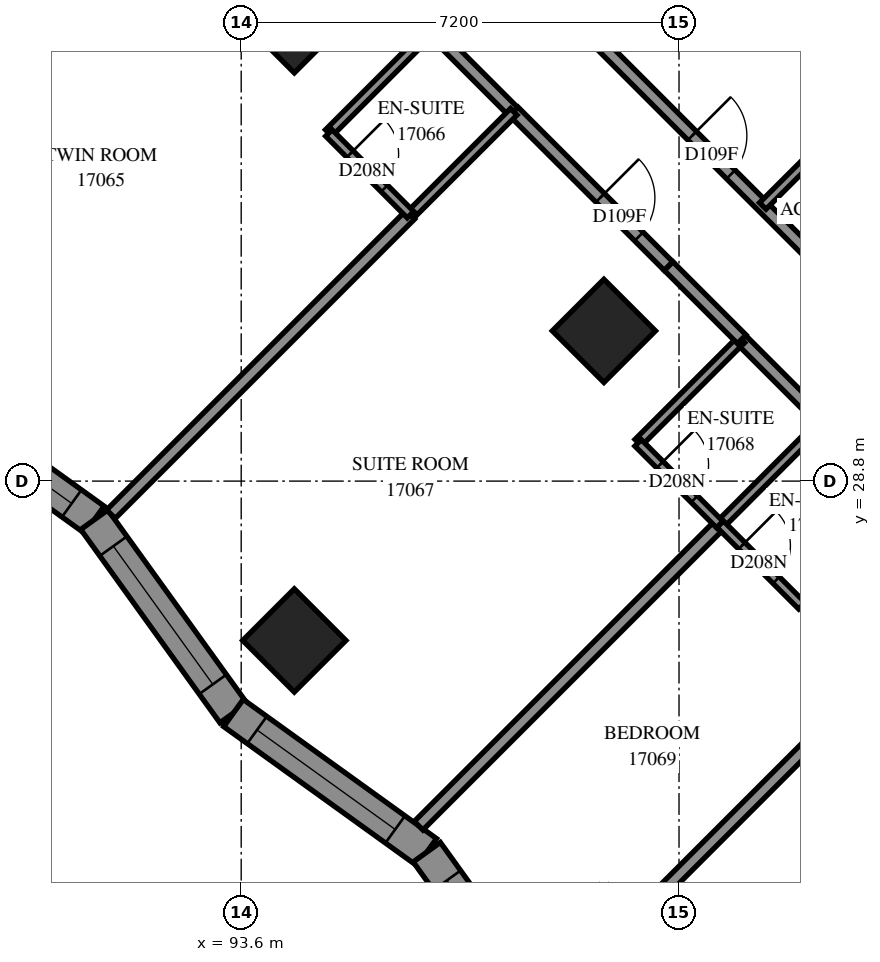
"""IFC4 building model, lengths in metres.
Left out: names, types, materials, properties, quantities, classifications, styles, units other than length and angle.
Written with IfcOpenShell. Run it as: python <this file> out.ifc"""

import sys

from ifc_helpers import new_model, si_unit, direction, frame, frame_2d, origin, origin_2d, place, context, subcontext, project, spatial, polyline, rectangle, outline, extrude, element, fill, save


model = new_model("IFC4")
c1 = context("Model", 3, precision=1e-05, world=origin(), true_north=direction((0.0, 1.0)))
c2 = subcontext(c1, "Body", "Model", "MODEL_VIEW")
j1 = project(units=[si_unit("LENGTHUNIT", "METRE"), si_unit("PLANEANGLEUNIT", "RADIAN")], contexts=[c1])
p1 = place(None, origin())
s1 = spatial("IfcSite", under=j1, at=p1, CompositionType="ELEMENT")
p2 = place(p1, origin())
s2 = spatial("IfcBuilding", under=s1, at=p2, CompositionType="ELEMENT")
p3 = place(p2, frame((0.0, 0.0, 64.4)))
s3 = spatial("IfcBuildingStorey", under=s2, at=p3, CompositionType="ELEMENT", Elevation=64.4)
for number, where, z_axis, x_axis in (
    (1, (94.474, 36.362, 0.0), (0.0, 0.0, 1.0), (0.707, -0.707, 0.0)),
    (2, (99.565, 31.271, 0.0), (0.0, 0.0, 1.0), (0.707, -0.707, 0.0)),
    (3, (94.474, 26.18, 0.0), (0.0, 0.0, 1.0), (0.707, -0.707, 0.0)),
):
    element("IfcColumn", number, at=place(p3, frame(where, z_axis=z_axis, x_axis=x_axis)), inside=s3, PredefinedType="COLUMN", context=c2, shape_type="SweptSolid", body=[
        extrude(rectangle(XDim=1.2, YDim=1.2, at=origin_2d()), origin(), (0.0, 0.0, 1.0), 3.1),
    ])
p4 = place(p3, frame((88.005, 30.454, 0.0), z_axis=(0.0, 0.0, 1.0), x_axis=(0.8116253681, -0.5841782792, 0.0)))
e4 = element("IfcWall", 4, at=p4, inside=s3, PredefinedType="SOLIDWALL", context=c2, shape_type="SweptSolid", body=[
    extrude(outline(polyline([(-0.045, -0.275), (3.872, -0.275), (3.962, 0.275), (0.045, 0.275), (-0.045, -0.275)])), origin(), (0.0, 0.0, 1.0), 3.1),
])
p5 = place(p4, frame((0.659, 0.0, 0.5)))
e5 = element("IfcOpeningElement", 5, at=p5, cuts=e4, PredefinedType="OPENING", context=c2, shape_type="SweptSolid", body=[
    extrude(rectangle(XDim=2.8, YDim=2.45, at=frame_2d((1.4, 1.225))), frame((0.0, 0.285, 0.0), z_axis=(0.0, -1.0, 0.0), x_axis=(1.0, 0.0, 0.0)), (0.0, 0.0, 1.0), 0.57),
])
p6 = place(p3, frame((91.184, 28.165, 0.0), z_axis=(0.0, 0.0, 1.0), x_axis=(0.5841782792, -0.8116253681, 0.0)))
e6 = element("IfcWall", 6, at=p6, inside=s3, PredefinedType="SOLIDWALL", context=c2, shape_type="SweptSolid", body=[
    extrude(outline(polyline([(0.045, -0.275), (3.962, -0.275), (3.872, 0.275), (-0.045, 0.275), (0.045, -0.275)])), origin(), (0.0, 0.0, 1.0), 3.1),
])
p7 = place(p6, frame((0.536, 0.0, 0.5)))
e7 = element("IfcOpeningElement", 7, at=p7, cuts=e6, PredefinedType="OPENING", context=c2, shape_type="SweptSolid", body=[
    extrude(rectangle(XDim=2.8, YDim=2.45, at=frame_2d((1.4, 1.225))), frame((0.0, 0.285, 0.0), z_axis=(0.0, -1.0, 0.0), x_axis=(1.0, 0.0, 0.0)), (0.0, 0.0, 1.0), 0.57),
])
p8 = place(p3, frame((93.473, 24.986, 0.0), z_axis=(0.0, 0.0, 1.0), x_axis=(0.8116253681, -0.5841782792, 0.0)))
e8 = element("IfcWall", 8, at=p8, inside=s3, PredefinedType="SOLIDWALL", context=c2, shape_type="SweptSolid", body=[
    extrude(outline(polyline([(-0.045, -0.275), (3.872, -0.275), (3.962, 0.275), (0.045, 0.275), (-0.045, -0.275)])), origin(), (0.0, 0.0, 1.0), 3.1),
])
p9 = place(p8, frame((0.477, 0.0, 0.5)))
e9 = element("IfcOpeningElement", 9, at=p9, cuts=e8, PredefinedType="OPENING", context=c2, shape_type="SweptSolid", body=[
    extrude(rectangle(XDim=2.8, YDim=2.45, at=frame_2d((1.4, 1.225))), frame((0.0, 0.285, 0.0), z_axis=(0.0, -1.0, 0.0), x_axis=(1.0, 0.0, 0.0)), (0.0, 0.0, 1.0), 0.57),
])
p10 = place(p3, frame((96.652, 22.698, 0.0), z_axis=(0.0, 0.0, 1.0), x_axis=(0.5841782792, -0.8116253681, 0.0)))
e10 = element("IfcWall", 10, at=p10, inside=s3, PredefinedType="SOLIDWALL", context=c2, shape_type="SweptSolid", body=[
    extrude(outline(polyline([(0.045, -0.275), (3.962, -0.275), (3.872, 0.275), (-0.045, 0.275), (0.045, -0.275)])), origin(), (0.0, 0.0, 1.0), 3.1),
])
p11 = place(p10, frame((0.57, 0.0, 0.7)))
e11 = element("IfcOpeningElement", 11, at=p11, cuts=e10, PredefinedType="OPENING", context=c2, shape_type="SweptSolid", body=[
    extrude(rectangle(XDim=1.8, YDim=2.0, at=frame_2d((0.9, 1.0))), frame((0.0, 0.285, 0.0), z_axis=(0.0, -1.0, 0.0), x_axis=(1.0, 0.0, 0.0)), (0.0, 0.0, 1.0), 0.57),
])
p12 = place(p3, frame((101.825, 31.125, 0.0), z_axis=(0.0, 0.0, 1.0), x_axis=(0.7071067812, -0.7071067812, 0.0)))
e12 = element("IfcWall", 12, at=p12, inside=s3, PredefinedType="PARTITIONING", context=c2, shape_type="SweptSolid", body=[
    extrude(rectangle(XDim=12.7, YDim=0.2, at=frame_2d((6.35, 0.0))), origin(), (0.0, 0.0, 1.0), 3.1),
])
p13 = place(p12, frame((3.895, 0.0, 0.0)))
e13 = element("IfcOpeningElement", 13, at=p13, cuts=e12, PredefinedType="OPENING", context=c2, shape_type="SweptSolid", body=[
    extrude(rectangle(XDim=0.9, YDim=2.1, at=frame_2d((0.45, 1.05))), frame((0.0, 0.11, 0.0), z_axis=(0.0, -1.0, 0.0), x_axis=(1.0, 0.0, 0.0)), (0.0, 0.0, 1.0), 0.22),
])
p14 = place(p12, frame((9.056, 0.0, 0.0)))
e14 = element("IfcOpeningElement", 14, at=p14, cuts=e12, PredefinedType="OPENING", context=c2, shape_type="SweptSolid", body=[
    extrude(rectangle(XDim=1.0, YDim=2.1, at=frame_2d((0.5, 1.05))), frame((0.0, 0.11, 0.0), z_axis=(0.0, -1.0, 0.0), x_axis=(1.0, 0.0, 0.0)), (0.0, 0.0, 1.0), 0.22),
])
p15 = place(p3, frame((86.309, 33.281, 0.0), z_axis=(0.0, 0.0, 1.0), x_axis=(0.7069956745, 0.7072178704, 0.0)))
e15 = element("IfcWall", 15, at=p15, inside=s3, PredefinedType="PARTITIONING", context=c2, shape_type="SweptSolid", body=[
    extrude(rectangle(XDim=9.451, YDim=0.2, at=frame_2d((4.726, 0.0))), origin(), (0.0, 0.0, 1.0), 3.1),
])
p16 = place(p3, frame((92.349, 40.601, 0.0), z_axis=(0.0, 0.0, 1.0), x_axis=(0.7071067812, -0.7071067812, 0.0)))
e16 = element("IfcWall", 16, at=p16, inside=s3, PredefinedType="PARTITIONING", context=c2, shape_type="SweptSolid", body=[
    extrude(rectangle(XDim=8.101, YDim=0.2, at=frame_2d((4.05, 0.0))), origin(), (0.0, 0.0, 1.0), 3.1),
])
p17 = place(p16, frame((2.909, 0.0, 0.0)))
e17 = element("IfcOpeningElement", 17, at=p17, cuts=e16, PredefinedType="OPENING", context=c2, shape_type="SweptSolid", body=[
    extrude(rectangle(XDim=0.9, YDim=2.1, at=frame_2d((0.45, 1.05))), frame((0.0, 0.11, 0.0), z_axis=(0.0, -1.0, 0.0), x_axis=(1.0, 0.0, 0.0)), (0.0, 0.0, 1.0), 0.22),
])
p18 = place(p3, frame((86.836, 35.372, 0.0), z_axis=(0.0, 0.0, 1.0), x_axis=(0.7071067812, 0.7071067812, 0.0)))
e18 = element("IfcWall", 18, at=p18, inside=s3, PredefinedType="PARTITIONING", context=c2, shape_type="SweptSolid", body=[
    extrude(rectangle(XDim=7.6, YDim=0.2, at=frame_2d((3.8, 0.0))), origin(), (0.0, 0.0, 1.0), 3.1),
])
p19 = place(p18, frame((6.342, 0.0, 0.0)))
e19 = element("IfcOpeningElement", 19, at=p19, cuts=e18, PredefinedType="OPENING", context=c2, shape_type="SweptSolid", body=[
    extrude(rectangle(XDim=1.0, YDim=2.1, at=frame_2d((0.5, 1.05))), frame((0.0, 0.11, 0.0), z_axis=(0.0, -1.0, 0.0), x_axis=(1.0, 0.0, 0.0)), (0.0, 0.0, 1.0), 0.22),
])
p20 = place(p3, frame((99.349, 36.147, 0.0), z_axis=(0.0, 0.0, 1.0), x_axis=(0.7071067812, -0.7071067812, 0.0)))
e20 = element("IfcWall", 20, at=p20, inside=s3, PredefinedType="PARTITIONING", context=c2, shape_type="SweptSolid", body=[
    extrude(rectangle(XDim=7.201, YDim=0.2, at=frame_2d((3.601, 0.0))), origin(), (0.0, 0.0, 1.0), 3.1),
])
p21 = place(p20, frame((2.358, 0.0, 0.0)))
e21 = element("IfcOpeningElement", 21, at=p21, cuts=e20, PredefinedType="OPENING", context=c2, shape_type="SweptSolid", body=[
    extrude(rectangle(XDim=0.9, YDim=2.1, at=frame_2d((0.45, 1.05))), frame((0.0, 0.11, 0.0), z_axis=(0.0, -1.0, 0.0), x_axis=(1.0, 0.0, 0.0)), (0.0, 0.0, 1.0), 0.22),
])
p22 = place(p3, frame((96.517, 23.134, 0.0), z_axis=(0.0, 0.0, 1.0), x_axis=(0.7071139158, 0.7070996465, 0.0)))
e22 = element("IfcWall", 22, at=p22, inside=s3, PredefinedType="PARTITIONING", context=c2, shape_type="SweptSolid", body=[
    extrude(rectangle(XDim=7.008, YDim=0.2, at=frame_2d((3.504, 0.0))), origin(), (0.0, 0.0, 1.0), 3.1),
])
p23 = place(p3, frame((91.458, 28.256, 0.0), z_axis=(0.0, 0.0, 1.0), x_axis=(0.7071067812, 0.7071067812, 0.0)))
e23 = element("IfcWall", 23, at=p23, inside=s3, PredefinedType="PARTITIONING", context=c2, shape_type="SweptSolid", body=[
    extrude(rectangle(XDim=6.963, YDim=0.2, at=frame_2d((3.482, 0.0))), origin(), (0.0, 0.0, 1.0), 3.1),
])
p24 = place(p3, frame((100.163, 21.689, 0.0), z_axis=(0.0, 0.0, 1.0), x_axis=(0.7071067812, 0.7071067812, 0.0)))
e24 = element("IfcWall", 24, at=p24, inside=s3, PredefinedType="PARTITIONING", context=c2, shape_type="SweptSolid", body=[
    extrude(rectangle(XDim=5.504, YDim=0.2, at=frame_2d((2.752, 0.0))), origin(), (0.0, 0.0, 1.0), 2.6),
])
p25 = place(p3, frame((98.082, 34.879, 0.0), z_axis=(0.0, 0.0, 1.0), x_axis=(0.7073845681, -0.7068288851, 0.0)))
e25 = element("IfcWall", 25, at=p25, inside=s3, PredefinedType="PARTITIONING", context=c2, shape_type="SweptSolid", body=[
    extrude(rectangle(XDim=3.599, YDim=0.2, at=frame_2d((1.8, 0.0))), origin(), (0.0, 0.0, 1.0), 3.1),
])
p26 = place(p25, frame((2.009, 0.0, 0.0)))
e26 = element("IfcOpeningElement", 26, at=p26, cuts=e25, PredefinedType="OPENING", context=c2, shape_type="SweptSolid", body=[
    extrude(rectangle(XDim=0.9, YDim=2.1, at=frame_2d((0.45, 1.05))), frame((0.0, 0.11, 0.0), z_axis=(0.0, -1.0, 0.0), x_axis=(1.0, 0.0, 0.0)), (0.0, 0.0, 1.0), 0.22),
])
p27 = place(p3, frame((100.129, 29.433, 0.0), z_axis=(0.0, 0.0, 1.0), x_axis=(0.7071067812, 0.7071067812, 0.0)))
e27 = element("IfcWall", 27, at=p27, inside=s3, PredefinedType="PARTITIONING", context=c2, shape_type="SweptSolid", body=[
    extrude(rectangle(XDim=2.401, YDim=0.15, at=frame_2d((1.201, 0.0))), origin(), (0.0, 0.0, 1.0), 3.1),
])
for number, where, z_axis, x_axis in (
    (28, (96.384, 33.178, 0.0), (0.0, 0.0, 1.0), (0.708, 0.707, 0.0)),
    (29, (101.477, 28.085, 0.0), (0.0, 0.0, 1.0), (0.707, 0.708, 0.0)),
    (30, (102.177, 33.325, 0.0), (0.0, 0.0, 1.0), (0.708, 0.707, 0.0)),
):
    element("IfcWall", number, at=place(p3, frame(where, z_axis=z_axis, x_axis=x_axis)), inside=s3, PredefinedType="PARTITIONING", context=c2, shape_type="SweptSolid", body=[
        extrude(rectangle(XDim=2.4, YDim=0.15, at=frame_2d((1.2, 0.0))), origin(), (0.0, 0.0, 1.0), 3.1),
    ])
for number, where, z_axis, x_axis in (
    (31, (95.039, 34.525, 0.0), (0.0, 0.0, 1.0), (0.707, 0.707, 0.0)),
    (32, (102.817, 26.747, 0.0), (0.0, 0.0, 1.0), (0.707, 0.707, 0.0)),
):
    element("IfcWall", number, at=place(p3, frame(where, z_axis=z_axis, x_axis=x_axis)), inside=s3, PredefinedType="PARTITIONING", context=c2, shape_type="SweptSolid", body=[
        extrude(rectangle(XDim=2.398, YDim=0.15, at=frame_2d((1.199, 0.0))), origin(), (0.0, 0.0, 1.0), 3.1),
    ])
p28 = place(p3, frame((100.127, 29.429, 0.0), z_axis=(0.0, 0.0, 1.0), x_axis=(0.7071067812, -0.7071067812, 0.0)))
e33 = element("IfcWall", 33, at=p28, inside=s3, PredefinedType="PARTITIONING", context=c2, shape_type="SweptSolid", body=[
    extrude(rectangle(XDim=1.901, YDim=0.15, at=frame_2d((0.95, 0.0))), origin(), (0.0, 0.0, 1.0), 3.1),
])
p29 = place(p28, frame((0.508, 0.0, 0.0)))
e34 = element("IfcOpeningElement", 34, at=p29, cuts=e33, PredefinedType="OPENING", context=c2, shape_type="SweptSolid", body=[
    extrude(rectangle(XDim=0.8, YDim=2.1, at=frame_2d((0.4, 1.05))), frame((0.0, 0.085, 0.0), z_axis=(0.0, -1.0, 0.0), x_axis=(1.0, 0.0, 0.0)), (0.0, 0.0, 1.0), 0.17),
])
p30 = place(p3, frame((95.042, 34.526, 0.0), z_axis=(0.0, 0.0, 1.0), x_axis=(0.7065800724, -0.7076330979, 0.0)))
e35 = element("IfcWall", 35, at=p30, inside=s3, PredefinedType="PARTITIONING", context=c2, shape_type="SweptSolid", body=[
    extrude(rectangle(XDim=1.899, YDim=0.15, at=frame_2d((0.95, 0.0))), origin(), (0.0, 0.0, 1.0), 3.1),
])
p31 = place(p30, frame((0.491, 0.0, 0.0)))
e36 = element("IfcOpeningElement", 36, at=p31, cuts=e35, PredefinedType="OPENING", context=c2, shape_type="SweptSolid", body=[
    extrude(rectangle(XDim=0.8, YDim=2.1, at=frame_2d((0.4, 1.05))), frame((0.0, 0.085, 0.0), z_axis=(0.0, -1.0, 0.0), x_axis=(1.0, 0.0, 0.0)), (0.0, 0.0, 1.0), 0.17),
])
p32 = place(p3, frame((101.477, 28.091, 0.0), z_axis=(0.0, 0.0, 1.0), x_axis=(0.7076330979, -0.7065800724, 0.0)))
e37 = element("IfcWall", 37, at=p32, inside=s3, PredefinedType="PARTITIONING", context=c2, shape_type="SweptSolid", body=[
    extrude(rectangle(XDim=1.899, YDim=0.15, at=frame_2d((0.95, 0.0))), origin(), (0.0, 0.0, 1.0), 3.1),
])
p33 = place(p32, frame((0.501, 0.0, 0.0)))
e38 = element("IfcOpeningElement", 38, at=p33, cuts=e37, PredefinedType="OPENING", context=c2, shape_type="SweptSolid", body=[
    extrude(rectangle(XDim=0.8, YDim=2.1, at=frame_2d((0.4, 1.05))), frame((0.0, 0.085, 0.0), z_axis=(0.0, -1.0, 0.0), x_axis=(1.0, 0.0, 0.0)), (0.0, 0.0, 1.0), 0.17),
])
p34 = place(p3, frame((100.629, 32.335, 0.0), z_axis=(0.0, 0.0, 1.0), x_axis=(0.7071067812, -0.7071067812, 0.0)))
e39 = element("IfcWall", 39, at=p34, inside=s3, PredefinedType="PARTITIONING", context=c2, shape_type="SweptSolid", body=[
    extrude(rectangle(XDim=1.7, YDim=0.2, at=frame_2d((0.85, 0.0))), origin(), (0.0, 0.0, 1.0), 3.1),
])
p35 = place(p5, origin())
e40 = element("IfcWindow", 40, at=p35, inside=s3, PartitioningType="SINGLE_PANEL", PredefinedType="WINDOW", context=c2, shape_type="SweptSolid", body=[
    extrude(rectangle(XDim=2.8, YDim=2.45, at=frame_2d((1.4, 1.225))), frame((0.0, 0.155, 0.0), z_axis=(0.0, -1.0, 0.0), x_axis=(1.0, 0.0, 0.0)), (0.0, 0.0, 1.0), 0.06),
])
fill(e5, e40)
p36 = place(p7, origin())
e41 = element("IfcWindow", 41, at=p36, inside=s3, PartitioningType="SINGLE_PANEL", PredefinedType="WINDOW", context=c2, shape_type="SweptSolid", body=[
    extrude(rectangle(XDim=2.8, YDim=2.45, at=frame_2d((1.4, 1.225))), frame((0.0, 0.155, 0.0), z_axis=(0.0, -1.0, 0.0), x_axis=(1.0, 0.0, 0.0)), (0.0, 0.0, 1.0), 0.06),
])
fill(e7, e41)
p37 = place(p9, origin())
e42 = element("IfcWindow", 42, at=p37, inside=s3, PartitioningType="SINGLE_PANEL", PredefinedType="WINDOW", context=c2, shape_type="SweptSolid", body=[
    extrude(rectangle(XDim=2.8, YDim=2.45, at=frame_2d((1.4, 1.225))), frame((0.0, 0.155, 0.0), z_axis=(0.0, -1.0, 0.0), x_axis=(1.0, 0.0, 0.0)), (0.0, 0.0, 1.0), 0.06),
])
fill(e9, e42)
p38 = place(p11, origin())
e43 = element("IfcWindow", 43, at=p38, inside=s3, PartitioningType="SINGLE_PANEL", PredefinedType="WINDOW", context=c2, shape_type="SweptSolid", body=[
    extrude(rectangle(XDim=1.8, YDim=2.0, at=frame_2d((0.9, 1.0))), frame((0.0, 0.155, 0.0), z_axis=(0.0, -1.0, 0.0), x_axis=(1.0, 0.0, 0.0)), (0.0, 0.0, 1.0), 0.06),
])
fill(e11, e43)
p39 = place(p21, origin())
e44 = element("IfcDoor", 44, at=p39, inside=s3, OperationType="SINGLE_SWING_RIGHT", PredefinedType="DOOR", context=c2, shape_type="SweptSolid", body=[
    extrude(rectangle(XDim=0.9, YDim=2.1, at=frame_2d((0.45, 1.05))), frame((0.0, 0.025, 0.0), z_axis=(0.0, -1.0, 0.0), x_axis=(1.0, 0.0, 0.0)), (0.0, 0.0, 1.0), 0.05),
])
fill(e21, e44)
p40 = place(p31, origin())
e45 = element("IfcDoor", 45, at=p40, inside=s3, OperationType="SINGLE_SWING_RIGHT", PredefinedType="DOOR", context=c2, shape_type="SweptSolid", body=[
    extrude(rectangle(XDim=0.8, YDim=2.1, at=frame_2d((0.4, 1.05))), frame((0.0, 0.025, 0.0), z_axis=(0.0, -1.0, 0.0), x_axis=(1.0, 0.0, 0.0)), (0.0, 0.0, 1.0), 0.05),
])
fill(e36, e45)
p41 = place(p26, origin())
e46 = element("IfcDoor", 46, at=p41, inside=s3, OperationType="SINGLE_SWING_LEFT", PredefinedType="DOOR", context=c2, shape_type="SweptSolid", body=[
    extrude(rectangle(XDim=0.9, YDim=2.1, at=frame_2d((0.45, 1.05))), frame((0.0, 0.025, 0.0), z_axis=(0.0, -1.0, 0.0), x_axis=(1.0, 0.0, 0.0)), (0.0, 0.0, 1.0), 0.05),
])
fill(e26, e46)
p42 = place(p29, origin())
e47 = element("IfcDoor", 47, at=p42, inside=s3, OperationType="SINGLE_SWING_RIGHT", PredefinedType="DOOR", context=c2, shape_type="SweptSolid", body=[
    extrude(rectangle(XDim=0.8, YDim=2.1, at=frame_2d((0.4, 1.05))), frame((0.0, 0.025, 0.0), z_axis=(0.0, -1.0, 0.0), x_axis=(1.0, 0.0, 0.0)), (0.0, 0.0, 1.0), 0.05),
])
fill(e34, e47)
p43 = place(p33, origin())
e48 = element("IfcDoor", 48, at=p43, inside=s3, OperationType="SINGLE_SWING_RIGHT", PredefinedType="DOOR", context=c2, shape_type="SweptSolid", body=[
    extrude(rectangle(XDim=0.8, YDim=2.1, at=frame_2d((0.4, 1.05))), frame((0.0, 0.025, 0.0), z_axis=(0.0, -1.0, 0.0), x_axis=(1.0, 0.0, 0.0)), (0.0, 0.0, 1.0), 0.05),
])
fill(e38, e48)
save(model, sys.argv[1])
